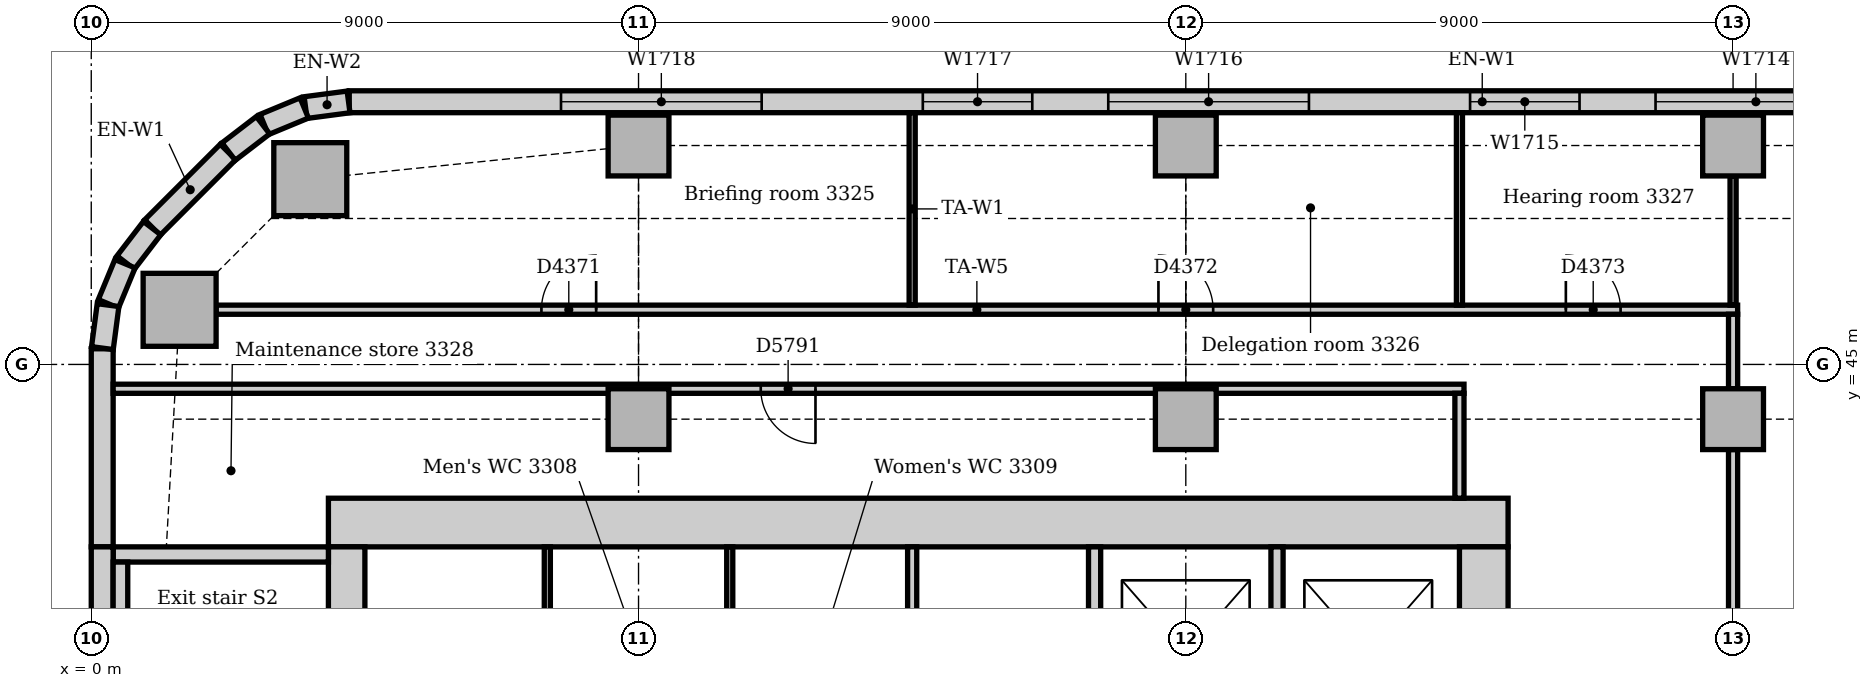
"""IFC4 building model, lengths in metres.
Left out: names, types, materials, properties, quantities, classifications, styles, units other than length and angle.
Written with IfcOpenShell. Run it as: python <this file> out.ifc"""

import sys

from ifc_helpers import new_model, si_unit, direction, frame, frame_2d, origin, origin_2d, place, context, subcontext, project, spatial, rectangle, extrude, element, fill, save


model = new_model("IFC4")
c1 = context("Model", 3, precision=1e-05, world=origin(), true_north=direction((0.0, 1.0)))
c2 = subcontext(c1, "Body", "Model", "MODEL_VIEW")
j1 = project(units=[si_unit("LENGTHUNIT", "METRE"), si_unit("PLANEANGLEUNIT", "RADIAN")], contexts=[c1])
p1 = place(None, origin())
s1 = spatial("IfcSite", under=j1, at=p1, CompositionType="ELEMENT")
p2 = place(p1, origin())
s2 = spatial("IfcBuilding", under=s1, at=p2, CompositionType="ELEMENT")
p3 = place(p2, frame((0.0, 0.0, 140.0)))
s3 = spatial("IfcBuildingStorey", under=s2, at=p3, CompositionType="ELEMENT", Elevation=140.0)
p4 = place(p3, frame((23.3, 42.4, 0.0), z_axis=(0.0, 0.0, 1.0), x_axis=(-1.0, 0.0, 0.0)))
e1 = element("IfcWall", 1, at=p4, inside=s3, PredefinedType="SOLIDWALL", context=c2, shape_type="SweptSolid", body=[
    extrude(rectangle(XDim=19.4, YDim=0.8, at=frame_2d((9.7, 0.0))), origin(), (0.0, 0.0, 1.0), 4.0),
])
p5 = place(p3, frame((22.9, 31.5, 0.0), z_axis=(0.0, 0.0, 1.0), x_axis=(0.0, 1.0, 0.0)))
e2 = element("IfcWall", 2, at=p5, inside=s3, PredefinedType="SOLIDWALL", context=c2, shape_type="SweptSolid", body=[
    extrude(rectangle(XDim=10.5, YDim=0.8, at=frame_2d((5.25, 0.0))), origin(), (0.0, 0.0, 1.0), 4.0),
])
p6 = place(p5, frame((3.15, 0.0, 0.0)))
e3 = element("IfcOpeningElement", 3, at=p6, cuts=e2, PredefinedType="OPENING", context=c2, shape_type="SweptSolid", body=[
    extrude(rectangle(XDim=1.0, YDim=2.1, at=frame_2d((0.5, 1.05))), frame((0.0, 0.41, 0.0), z_axis=(0.0, -1.0, 0.0), x_axis=(1.0, 0.0, 0.0)), (0.0, 0.0, 1.0), 0.82),
])
p7 = place(p5, frame((5.2, 0.0, 0.0)))
e4 = element("IfcOpeningElement", 4, at=p7, cuts=e2, PredefinedType="OPENING", context=c2, shape_type="SweptSolid", body=[
    extrude(rectangle(XDim=1.0, YDim=2.1, at=frame_2d((0.5, 1.05))), frame((0.0, 0.41, 0.0), z_axis=(0.0, -1.0, 0.0), x_axis=(1.0, 0.0, 0.0)), (0.0, 0.0, 1.0), 0.82),
])
p8 = place(p3, frame((4.2, 42.0, 0.0), z_axis=(0.0, 0.0, 1.0), x_axis=(0.0, -1.0, 0.0)))
e5 = element("IfcWall", 5, at=p8, inside=s3, PredefinedType="SOLIDWALL", context=c2, shape_type="SweptSolid", body=[
    extrude(rectangle(XDim=10.5, YDim=0.6, at=frame_2d((5.25, 0.0))), origin(), (0.0, 0.0, 1.0), 4.0),
])
p9 = place(p8, frame((5.3, 0.0, 0.0)))
e6 = element("IfcOpeningElement", 6, at=p9, cuts=e5, PredefinedType="OPENING", context=c2, shape_type="SweptSolid", body=[
    extrude(rectangle(XDim=1.0, YDim=2.1, at=frame_2d((0.5, 1.05))), frame((0.0, 0.31, 0.0), z_axis=(0.0, -1.0, 0.0), x_axis=(1.0, 0.0, 0.0)), (0.0, 0.0, 1.0), 0.62),
])
p10 = place(p3, frame((3.9, 41.875, 0.0), z_axis=(0.0, 0.0, 1.0), x_axis=(-1.0, 0.0, 0.0)))
e7 = element("IfcWall", 7, at=p10, inside=s3, PredefinedType="SOLIDWALL", context=c2, shape_type="SweptSolid", body=[
    extrude(rectangle(XDim=3.54, YDim=0.25, at=frame_2d((1.77, 0.0))), origin(), (0.0, 0.0, 1.0), 4.0),
])
for number, where, z_axis, x_axis in (
    (8, (3.602, 48.047, 0.0), (0.0, 0.0, 1.0), (1.0, 0.0, 0.0)),
    (9, (1.453, 45.898, 0.0), (0.0, 0.0, 1.0), (1.0, 0.0, 0.0)),
):
    element("IfcColumn", number, at=place(p3, frame(where, z_axis=z_axis, x_axis=x_axis)), inside=s3, PredefinedType="COLUMN", context=c2, shape_type="SweptSolid", body=[
        extrude(rectangle(XDim=1.2, YDim=1.2, at=origin_2d()), origin(), (0.0, 0.0, 1.0), 3.7),
    ])
for number, where, z_axis, x_axis in (
    (10, (9.0, 48.6, 0.0), (0.0, 0.0, 1.0), (1.0, 0.0, 0.0)),
    (11, (18.0, 48.6, 0.0), (0.0, 0.0, 1.0), (1.0, 0.0, 0.0)),
    (12, (27.0, 48.6, 0.0), (0.0, 0.0, 1.0), (1.0, 0.0, 0.0)),
    (13, (9.0, 44.1, 0.0), (0.0, 0.0, 1.0), (1.0, 0.0, 0.0)),
    (14, (18.0, 44.1, 0.0), (0.0, 0.0, 1.0), (1.0, 0.0, 0.0)),
    (15, (27.0, 44.1, 0.0), (0.0, 0.0, 1.0), (1.0, 0.0, 0.0)),
):
    element("IfcColumn", number, at=place(p3, frame(where, z_axis=z_axis, x_axis=x_axis)), inside=s3, PredefinedType="COLUMN", context=c2, shape_type="SweptSolid", body=[
        extrude(rectangle(XDim=1.0, YDim=1.0, at=origin_2d()), origin(), (0.0, 0.0, 1.0), 3.7),
    ])
p11 = place(p3, frame((41.507, 49.32, 0.0), z_axis=(0.0, 0.0, 1.0), x_axis=(-1.0, 0.0, 0.0)))
e16 = element("IfcWall", 16, at=p11, inside=s3, PredefinedType="STANDARD", context=c2, shape_type="SweptSolid", body=[
    extrude(rectangle(XDim=37.265, YDim=0.36, at=frame_2d((18.632, 0.0))), origin(), (0.0, 0.0, 1.0), 3.7),
])
p12 = place(p11, frame((3.482, 0.0, 0.9)))
e17 = element("IfcOpeningElement", 17, at=p12, cuts=e16, PredefinedType="OPENING", context=c2, shape_type="SweptSolid", body=[
    extrude(rectangle(XDim=3.3, YDim=1.6, at=frame_2d((1.65, 0.8))), frame((0.0, 0.19, 0.0), z_axis=(0.0, -1.0, 0.0), x_axis=(1.0, 0.0, 0.0)), (0.0, 0.0, 1.0), 0.38),
])
p13 = place(p11, frame((7.982, 0.0, 0.9)))
e18 = element("IfcOpeningElement", 18, at=p13, cuts=e16, PredefinedType="OPENING", context=c2, shape_type="SweptSolid", body=[
    extrude(rectangle(XDim=3.3, YDim=1.6, at=frame_2d((1.65, 0.8))), frame((0.0, 0.19, 0.0), z_axis=(0.0, -1.0, 0.0), x_axis=(1.0, 0.0, 0.0)), (0.0, 0.0, 1.0), 0.38),
])
p14 = place(p11, frame((12.482, 0.0, 0.9)))
e19 = element("IfcOpeningElement", 19, at=p14, cuts=e16, PredefinedType="OPENING", context=c2, shape_type="SweptSolid", body=[
    extrude(rectangle(XDim=3.3, YDim=1.6, at=frame_2d((1.65, 0.8))), frame((0.0, 0.19, 0.0), z_axis=(0.0, -1.0, 0.0), x_axis=(1.0, 0.0, 0.0)), (0.0, 0.0, 1.0), 0.38),
])
p15 = place(p11, frame((17.032, 0.0, 0.9)))
e20 = element("IfcOpeningElement", 20, at=p15, cuts=e16, PredefinedType="OPENING", context=c2, shape_type="SweptSolid", body=[
    extrude(rectangle(XDim=1.8, YDim=1.6, at=frame_2d((0.9, 0.8))), frame((0.0, 0.19, 0.0), z_axis=(0.0, -1.0, 0.0), x_axis=(1.0, 0.0, 0.0)), (0.0, 0.0, 1.0), 0.38),
])
p16 = place(p11, frame((21.482, 0.0, 0.9)))
e21 = element("IfcOpeningElement", 21, at=p16, cuts=e16, PredefinedType="OPENING", context=c2, shape_type="SweptSolid", body=[
    extrude(rectangle(XDim=3.3, YDim=1.6, at=frame_2d((1.65, 0.8))), frame((0.0, 0.19, 0.0), z_axis=(0.0, -1.0, 0.0), x_axis=(1.0, 0.0, 0.0)), (0.0, 0.0, 1.0), 0.38),
])
p17 = place(p11, frame((26.032, 0.0, 0.9)))
e22 = element("IfcOpeningElement", 22, at=p17, cuts=e16, PredefinedType="OPENING", context=c2, shape_type="SweptSolid", body=[
    extrude(rectangle(XDim=1.8, YDim=1.6, at=frame_2d((0.9, 0.8))), frame((0.0, 0.19, 0.0), z_axis=(0.0, -1.0, 0.0), x_axis=(1.0, 0.0, 0.0)), (0.0, 0.0, 1.0), 0.38),
])
p18 = place(p11, frame((30.482, 0.0, 0.9)))
e23 = element("IfcOpeningElement", 23, at=p18, cuts=e16, PredefinedType="OPENING", context=c2, shape_type="SweptSolid", body=[
    extrude(rectangle(XDim=3.3, YDim=1.6, at=frame_2d((1.65, 0.8))), frame((0.0, 0.19, 0.0), z_axis=(0.0, -1.0, 0.0), x_axis=(1.0, 0.0, 0.0)), (0.0, 0.0, 1.0), 0.38),
])
p19 = place(p3, frame((2.249, 48.494, 0.0), z_axis=(0.0, 0.0, 1.0), x_axis=(-0.707106781187, -0.707106781187, 0.0)))
e24 = element("IfcWall", 24, at=p19, inside=s3, PredefinedType="STANDARD", context=c2, shape_type="SweptSolid", body=[
    extrude(rectangle(XDim=1.757, YDim=0.36, at=frame_2d((0.879, 0.0))), origin(), (0.0, 0.0, 1.0), 3.7),
])
p20 = place(p3, frame((0.18, 45.257, 0.0), z_axis=(0.0, 0.0, 1.0), x_axis=(0.0, -1.0, 0.0)))
e25 = element("IfcWall", 25, at=p20, inside=s3, PredefinedType="STANDARD", context=c2, shape_type="SweptSolid", body=[
    extrude(rectangle(XDim=3.257, YDim=0.36, at=frame_2d((1.629, 0.0))), origin(), (0.0, 0.0, 1.0), 3.7),
])
p21 = place(p3, frame((0.18, 42.0, 0.0), z_axis=(0.0, 0.0, 1.0), x_axis=(0.0, -1.0, 0.0)))
e26 = element("IfcWall", 26, at=p21, inside=s3, PredefinedType="STANDARD", context=c2, shape_type="SweptSolid", body=[
    extrude(rectangle(XDim=6.75, YDim=0.36, at=frame_2d((3.375, 0.0))), origin(), (0.0, 0.0, 1.0), 3.7),
])
for number, where, z_axis, x_axis in (
    (27, (4.231, 49.317, 0.0), (0.0, 0.0, 1.0), (-0.991, -0.131, 0.0)),
    (28, (3.503, 49.218, 0.0), (0.0, 0.0, 1.0), (-0.924, -0.383, 0.0)),
):
    element("IfcWall", number, at=place(p3, frame(where, z_axis=z_axis, x_axis=x_axis)), inside=s3, PredefinedType="STANDARD", context=c2, shape_type="SweptSolid", body=[
        extrude(rectangle(XDim=0.713, YDim=0.36, at=frame_2d((0.356, 0.0))), origin(), (0.0, 0.0, 1.0), 3.7),
    ])
for number, where, z_axis, x_axis in (
    (29, (2.825, 48.934, 0.0), (0.0, 0.0, 1.0), (-0.793, -0.609, 0.0)),
    (30, (1.0, 47.241, 0.0), (0.0, 0.0, 1.0), (-0.609, -0.793, 0.0)),
):
    element("IfcWall", number, at=place(p3, frame(where, z_axis=z_axis, x_axis=x_axis)), inside=s3, PredefinedType="STANDARD", context=c2, shape_type="SweptSolid", body=[
        extrude(rectangle(XDim=0.713, YDim=0.36, at=frame_2d((0.357, 0.0))), origin(), (0.0, 0.0, 1.0), 3.7),
    ])
for number, where, z_axis, x_axis in (
    (31, (0.555, 46.656, 0.0), (0.0, 0.0, 1.0), (-0.383, -0.924, 0.0)),
    (32, (0.276, 45.976, 0.0), (0.0, 0.0, 1.0), (-0.131, -0.991, 0.0)),
):
    element("IfcWall", number, at=place(p3, frame(where, z_axis=z_axis, x_axis=x_axis)), inside=s3, PredefinedType="STANDARD", context=c2, shape_type="SweptSolid", body=[
        extrude(rectangle(XDim=0.713, YDim=0.36, at=frame_2d((0.356, 0.0))), origin(), (0.0, 0.0, 1.0), 3.7),
    ])
p22 = place(p3, frame((0.48, 40.13, 0.0), z_axis=(0.0, 0.0, 1.0), x_axis=(0.0, 1.0, 0.0)))
e33 = element("IfcWall", 33, at=p22, inside=s3, PredefinedType="STANDARD", context=c2, shape_type="SweptSolid", body=[
    extrude(rectangle(XDim=1.62, YDim=0.24, at=frame_2d((0.81, 0.0))), origin(), (0.0, 0.0, 1.0), 4.0),
])
for number, where, z_axis, x_axis in (
    (34, (16.5, 38.6, 0.0), (0.0, 0.0, 1.0), (0.0, 1.0, 0.0)),
    (35, (19.5, 38.6, 0.0), (0.0, 0.0, 1.0), (0.0, 1.0, 0.0)),
):
    element("IfcWall", number, at=place(p3, frame(where, z_axis=z_axis, x_axis=x_axis)), inside=s3, PredefinedType="PARTITIONING", context=c2, shape_type="SweptSolid", body=[
        extrude(rectangle(XDim=3.4, YDim=0.2, at=frame_2d((1.7, 0.0))), origin(), (0.0, 0.0, 1.0), 3.7),
    ])
p23 = place(p3, frame((2.053, 45.9, 0.0), z_axis=(0.0, 0.0, 1.0), x_axis=(1.0, 0.0, 0.0)))
e36 = element("IfcWall", 36, at=p23, inside=s3, PredefinedType="PARTITIONING", context=c2, shape_type="SweptSolid", body=[
    extrude(rectangle(XDim=25.022, YDim=0.15, at=frame_2d((12.511, 0.0))), origin(), (0.0, 0.0, 1.0), 3.7),
])
p24 = place(p23, frame((5.35, 0.0, 0.0)))
e37 = element("IfcOpeningElement", 37, at=p24, cuts=e36, PredefinedType="OPENING", context=c2, shape_type="SweptSolid", body=[
    extrude(rectangle(XDim=0.9, YDim=2.1, at=frame_2d((0.45, 1.05))), frame((0.0, 0.085, 0.0), z_axis=(0.0, -1.0, 0.0), x_axis=(1.0, 0.0, 0.0)), (0.0, 0.0, 1.0), 0.17),
])
p25 = place(p23, frame((15.497, 0.0, 0.0)))
e38 = element("IfcOpeningElement", 38, at=p25, cuts=e36, PredefinedType="OPENING", context=c2, shape_type="SweptSolid", body=[
    extrude(rectangle(XDim=0.9, YDim=2.1, at=frame_2d((0.45, 1.05))), frame((0.0, 0.085, 0.0), z_axis=(0.0, -1.0, 0.0), x_axis=(1.0, 0.0, 0.0)), (0.0, 0.0, 1.0), 0.17),
])
p26 = place(p23, frame((22.197, 0.0, 0.0)))
e39 = element("IfcOpeningElement", 39, at=p26, cuts=e36, PredefinedType="OPENING", context=c2, shape_type="SweptSolid", body=[
    extrude(rectangle(XDim=0.9, YDim=2.1, at=frame_2d((0.45, 1.05))), frame((0.0, 0.085, 0.0), z_axis=(0.0, -1.0, 0.0), x_axis=(1.0, 0.0, 0.0)), (0.0, 0.0, 1.0), 0.17),
])
p27 = place(p3, frame((0.36, 44.6, 0.0), z_axis=(0.0, 0.0, 1.0), x_axis=(1.0, 0.0, 0.0)))
e40 = element("IfcWall", 40, at=p27, inside=s3, PredefinedType="PARTITIONING", context=c2, shape_type="SweptSolid", body=[
    extrude(rectangle(XDim=22.215, YDim=0.15, at=frame_2d((11.107, 0.0))), origin(), (0.0, 0.0, 1.0), 3.7),
])
p28 = place(p27, frame((10.65, 0.0, 0.0)))
e41 = element("IfcOpeningElement", 41, at=p28, cuts=e40, PredefinedType="OPENING", context=c2, shape_type="SweptSolid", body=[
    extrude(rectangle(XDim=0.9, YDim=2.1, at=frame_2d((0.45, 1.05))), frame((0.0, 0.085, 0.0), z_axis=(0.0, -1.0, 0.0), x_axis=(1.0, 0.0, 0.0)), (0.0, 0.0, 1.0), 0.17),
])
p29 = place(p3, frame((27.0, 36.5, 0.0), z_axis=(0.0, 0.0, 1.0), x_axis=(0.0, 1.0, 0.0)))
e42 = element("IfcWall", 42, at=p29, inside=s3, PredefinedType="PARTITIONING", context=c2, shape_type="SweptSolid", body=[
    extrude(rectangle(XDim=7.1, YDim=0.15, at=frame_2d((3.55, 0.0))), origin(), (0.0, 0.0, 1.0), 3.106),
])
p30 = place(p29, frame((0.45, 0.0, 0.0)))
e43 = element("IfcOpeningElement", 43, at=p30, cuts=e42, PredefinedType="OPENING", context=c2, shape_type="SweptSolid", body=[
    extrude(rectangle(XDim=1.0, YDim=2.1, at=frame_2d((0.5, 1.05))), frame((0.0, 0.085, 0.0), z_axis=(0.0, -1.0, 0.0), x_axis=(1.0, 0.0, 0.0)), (0.0, 0.0, 1.0), 0.17),
])
p31 = place(p3, frame((27.0, 44.6, 0.0), z_axis=(0.0, 0.0, 1.0), x_axis=(0.0, 1.0, 0.0)))
e44 = element("IfcWall", 44, at=p31, inside=s3, PredefinedType="PARTITIONING", context=c2, shape_type="SweptSolid", body=[
    extrude(rectangle(XDim=1.225, YDim=0.15, at=frame_2d((0.613, 0.0))), origin(), (0.0, 0.0, 1.0), 3.502),
])
p32 = place(p3, frame((22.5, 42.8, 0.0), z_axis=(0.0, 0.0, 1.0), x_axis=(0.0, 1.0, 0.0)))
e45 = element("IfcWall", 45, at=p32, inside=s3, PredefinedType="PARTITIONING", context=c2, shape_type="SweptSolid", body=[
    extrude(rectangle(XDim=1.725, YDim=0.15, at=frame_2d((0.863, 0.0))), origin(), (0.0, 0.0, 1.0), 3.7),
])
p33 = place(p3, frame((13.5, 38.575, 0.0), z_axis=(0.0, 0.0, 1.0), x_axis=(0.0, 1.0, 0.0)))
e46 = element("IfcWall", 46, at=p33, inside=s3, PredefinedType="PARTITIONING", context=c2, shape_type="SweptSolid", body=[
    extrude(rectangle(XDim=3.425, YDim=0.15, at=frame_2d((1.712, 0.0))), origin(), (0.0, 0.0, 1.0), 3.7),
])
for number, where, z_axis, x_axis in (
    (47, (7.5, 38.575, 0.0), (0.0, 0.0, 1.0), (0.0, 1.0, 0.0)),
    (48, (10.5, 38.575, 0.0), (0.0, 0.0, 1.0), (0.0, 1.0, 0.0)),
):
    element("IfcWall", number, at=place(p3, frame(where, z_axis=z_axis, x_axis=x_axis)), inside=s3, PredefinedType="PARTITIONING", context=c2, shape_type="SweptSolid", body=[
        extrude(rectangle(XDim=3.425, YDim=0.1, at=frame_2d((1.712, 0.0))), origin(), (0.0, 0.0, 1.0), 3.7),
    ])
for number, where, z_axis, x_axis in (
    (49, (13.5, 45.975, 0.0), (0.0, 0.0, 1.0), (0.0, 1.0, 0.0)),
    (50, (22.5, 45.975, 0.0), (0.0, 0.0, 1.0), (0.0, 1.0, 0.0)),
):
    element("IfcWall", number, at=place(p3, frame(where, z_axis=z_axis, x_axis=x_axis)), inside=s3, PredefinedType="PARTITIONING", context=c2, shape_type="SweptSolid", body=[
        extrude(rectangle(XDim=3.165, YDim=0.1, at=frame_2d((1.583, 0.0))), origin(), (0.0, 0.0, 1.0), 3.7),
    ])
p34 = place(p3, frame((27.0, 45.975, 0.0), z_axis=(0.0, 0.0, 1.0), x_axis=(0.0, 1.0, 0.0)))
e51 = element("IfcWall", 51, at=p34, inside=s3, PredefinedType="PARTITIONING", context=c2, shape_type="SweptSolid", body=[
    extrude(rectangle(XDim=2.125, YDim=0.1, at=frame_2d((1.062, 0.0))), origin(), (0.0, 0.0, 1.0), 3.502),
])
p35 = place(p14, origin())
e52 = element("IfcWindow", 52, at=p35, inside=s3, PartitioningType="SINGLE_PANEL", PredefinedType="WINDOW", context=c2, shape_type="SweptSolid", body=[
    extrude(rectangle(XDim=3.3, YDim=1.6, at=frame_2d((1.65, 0.8))), frame((0.0, 0.13, 0.0), z_axis=(0.0, -1.0, 0.0), x_axis=(1.0, 0.0, 0.0)), (0.0, 0.0, 1.0), 0.06),
])
fill(e19, e52)
p36 = place(p15, origin())
e53 = element("IfcWindow", 53, at=p36, inside=s3, PartitioningType="SINGLE_PANEL", PredefinedType="WINDOW", context=c2, shape_type="SweptSolid", body=[
    extrude(rectangle(XDim=1.8, YDim=1.6, at=frame_2d((0.9, 0.8))), frame((0.0, 0.13, 0.0), z_axis=(0.0, -1.0, 0.0), x_axis=(1.0, 0.0, 0.0)), (0.0, 0.0, 1.0), 0.06),
])
fill(e20, e53)
p37 = place(p16, origin())
e54 = element("IfcWindow", 54, at=p37, inside=s3, PartitioningType="SINGLE_PANEL", PredefinedType="WINDOW", context=c2, shape_type="SweptSolid", body=[
    extrude(rectangle(XDim=3.3, YDim=1.6, at=frame_2d((1.65, 0.8))), frame((0.0, 0.13, 0.0), z_axis=(0.0, -1.0, 0.0), x_axis=(1.0, 0.0, 0.0)), (0.0, 0.0, 1.0), 0.06),
])
fill(e21, e54)
p38 = place(p17, origin())
e55 = element("IfcWindow", 55, at=p38, inside=s3, PartitioningType="SINGLE_PANEL", PredefinedType="WINDOW", context=c2, shape_type="SweptSolid", body=[
    extrude(rectangle(XDim=1.8, YDim=1.6, at=frame_2d((0.9, 0.8))), frame((0.0, 0.13, 0.0), z_axis=(0.0, -1.0, 0.0), x_axis=(1.0, 0.0, 0.0)), (0.0, 0.0, 1.0), 0.06),
])
fill(e22, e55)
p39 = place(p18, origin())
e56 = element("IfcWindow", 56, at=p39, inside=s3, PartitioningType="SINGLE_PANEL", PredefinedType="WINDOW", context=c2, shape_type="SweptSolid", body=[
    extrude(rectangle(XDim=3.3, YDim=1.6, at=frame_2d((1.65, 0.8))), frame((0.0, 0.13, 0.0), z_axis=(0.0, -1.0, 0.0), x_axis=(1.0, 0.0, 0.0)), (0.0, 0.0, 1.0), 0.06),
])
fill(e23, e56)
p40 = place(p24, origin())
e57 = element("IfcDoor", 57, at=p40, inside=s3, OperationType="SINGLE_SWING_RIGHT", PredefinedType="DOOR", context=c2, shape_type="SweptSolid", body=[
    extrude(rectangle(XDim=0.9, YDim=2.1, at=frame_2d((0.45, 1.05))), frame((0.0, 0.025, 0.0), z_axis=(0.0, -1.0, 0.0), x_axis=(1.0, 0.0, 0.0)), (0.0, 0.0, 1.0), 0.05),
])
fill(e37, e57)
p41 = place(p25, origin())
e58 = element("IfcDoor", 58, at=p41, inside=s3, OperationType="SINGLE_SWING_LEFT", PredefinedType="DOOR", context=c2, shape_type="SweptSolid", body=[
    extrude(rectangle(XDim=0.9, YDim=2.1, at=frame_2d((0.45, 1.05))), frame((0.0, 0.025, 0.0), z_axis=(0.0, -1.0, 0.0), x_axis=(1.0, 0.0, 0.0)), (0.0, 0.0, 1.0), 0.05),
])
fill(e38, e58)
p42 = place(p26, origin())
e59 = element("IfcDoor", 59, at=p42, inside=s3, OperationType="SINGLE_SWING_LEFT", PredefinedType="DOOR", context=c2, shape_type="SweptSolid", body=[
    extrude(rectangle(XDim=0.9, YDim=2.1, at=frame_2d((0.45, 1.05))), frame((0.0, 0.025, 0.0), z_axis=(0.0, -1.0, 0.0), x_axis=(1.0, 0.0, 0.0)), (0.0, 0.0, 1.0), 0.05),
])
fill(e39, e59)
p43 = place(p28, frame((0.9, 0.0, 0.0), z_axis=(0.0, 0.0, 1.0), x_axis=(-1.0, 0.0, 0.0)))
e60 = element("IfcDoor", 60, at=p43, inside=s3, OperationType="SINGLE_SWING_LEFT", PredefinedType="DOOR", context=c2, shape_type="SweptSolid", body=[
    extrude(rectangle(XDim=0.9, YDim=2.1, at=frame_2d((0.45, 1.05))), frame((0.0, 0.025, 0.0), z_axis=(0.0, -1.0, 0.0), x_axis=(1.0, 0.0, 0.0)), (0.0, 0.0, 1.0), 0.05),
])
fill(e41, e60)
save(model, sys.argv[1])
